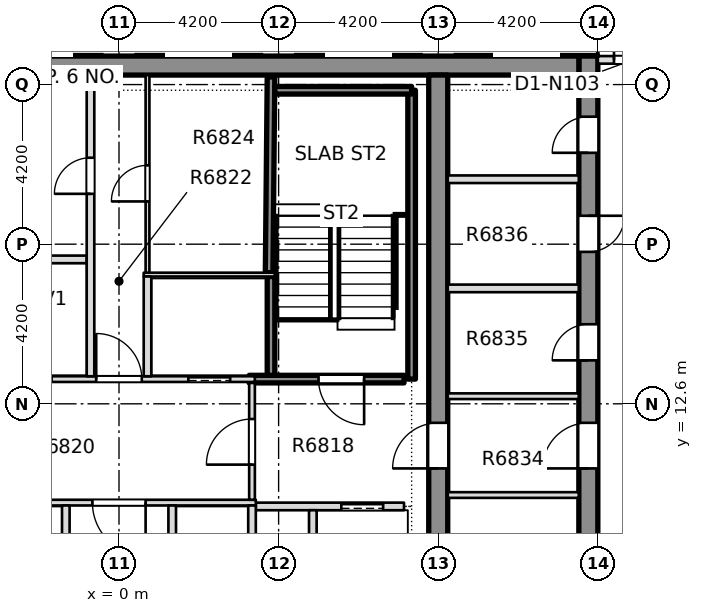
"""IFC4 building model, lengths in metres.
Left out: names, types, materials, properties, quantities, classifications, styles, units other than length and angle.
Written with IfcOpenShell. Run it as: python <this file> out.ifc"""

import sys

from ifc_helpers import new_model, si_unit, direction, frame, frame_2d, origin, place, context, subcontext, project, spatial, rectangle, extrude, element, fill, save


model = new_model("IFC4")
c1 = context("Model", 3, precision=1e-05, world=origin(), true_north=direction((0.0, 1.0)))
c2 = subcontext(c1, "Body", "Model", "MODEL_VIEW")
j1 = project(units=[si_unit("LENGTHUNIT", "METRE"), si_unit("PLANEANGLEUNIT", "RADIAN")], contexts=[c1])
p1 = place(None, origin())
s1 = spatial("IfcSite", under=j1, at=p1, CompositionType="ELEMENT")
p2 = place(p1, origin())
s2 = spatial("IfcBuilding", under=s1, at=p2, CompositionType="ELEMENT")
p3 = place(p2, frame((0.0, 0.0, 257.95)))
s3 = spatial("IfcBuildingStorey", under=s2, at=p3, CompositionType="ELEMENT", Elevation=257.95)
p4 = place(p3, frame((12.35, -8.4, -0.4), z_axis=(0.0, 0.0, 1.0), x_axis=(0.0, 1.0, 0.0)))
e1 = element("IfcWall", 1, at=p4, inside=s3, PredefinedType="SHEAR", context=c2, shape_type="SweptSolid", body=[
    extrude(rectangle(XDim=30.15, YDim=0.5, at=frame_2d((15.075, 0.0))), origin(), (0.0, 0.0, 1.0), 3.45),
])
p5 = place(p4, frame((4.113, 0.0, 0.4)))
e2 = element("IfcOpeningElement", 2, at=p5, cuts=e1, PredefinedType="OPENING", context=c2, shape_type="SweptSolid", body=[
    extrude(rectangle(XDim=0.95, YDim=2.1, at=frame_2d((0.475, 1.05))), frame((0.0, 0.26, 0.0), z_axis=(0.0, -1.0, 0.0), x_axis=(1.0, 0.0, 0.0)), (0.0, 0.0, 1.0), 0.52),
])
p6 = place(p4, frame((9.89, 0.0, 0.4)))
e3 = element("IfcOpeningElement", 3, at=p6, cuts=e1, PredefinedType="OPENING", context=c2, shape_type="SweptSolid", body=[
    extrude(rectangle(XDim=0.95, YDim=2.1, at=frame_2d((0.475, 1.05))), frame((0.0, 0.26, 0.0), z_axis=(0.0, -1.0, 0.0), x_axis=(1.0, 0.0, 0.0)), (0.0, 0.0, 1.0), 0.52),
])
p7 = place(p4, frame((15.052, 0.0, 0.4)))
e4 = element("IfcOpeningElement", 4, at=p7, cuts=e1, PredefinedType="OPENING", context=c2, shape_type="SweptSolid", body=[
    extrude(rectangle(XDim=0.95, YDim=2.1, at=frame_2d((0.475, 1.05))), frame((0.0, 0.26, 0.0), z_axis=(0.0, -1.0, 0.0), x_axis=(1.0, 0.0, 0.0)), (0.0, 0.0, 1.0), 0.52),
])
p8 = place(p4, frame((22.144, 0.0, 0.4)))
e5 = element("IfcOpeningElement", 5, at=p8, cuts=e1, PredefinedType="OPENING", context=c2, shape_type="SweptSolid", body=[
    extrude(rectangle(XDim=0.95, YDim=2.1, at=frame_2d((0.475, 1.05))), frame((0.0, 0.26, 0.0), z_axis=(0.0, -1.0, 0.0), x_axis=(1.0, 0.0, 0.0)), (0.0, 0.0, 1.0), 0.52),
])
p9 = place(p4, frame((24.998, 0.0, 0.4)))
e6 = element("IfcOpeningElement", 6, at=p9, cuts=e1, PredefinedType="OPENING", context=c2, shape_type="SweptSolid", body=[
    extrude(rectangle(XDim=0.95, YDim=2.1, at=frame_2d((0.475, 1.05))), frame((0.0, 0.26, 0.0), z_axis=(0.0, -1.0, 0.0), x_axis=(1.0, 0.0, 0.0)), (0.0, 0.0, 1.0), 0.52),
])
p10 = place(p4, frame((27.605, 0.0, 0.4)))
e7 = element("IfcOpeningElement", 7, at=p10, cuts=e1, PredefinedType="OPENING", context=c2, shape_type="SweptSolid", body=[
    extrude(rectangle(XDim=0.95, YDim=2.1, at=frame_2d((0.475, 1.05))), frame((0.0, 0.26, 0.0), z_axis=(0.0, -1.0, 0.0), x_axis=(1.0, 0.0, 0.0)), (0.0, 0.0, 1.0), 0.52),
])
p11 = place(p4, frame((19.3, 0.0, 0.4)))
e8 = element("IfcOpeningElement", 8, at=p11, cuts=e1, PredefinedType="OPENING", context=c2, shape_type="SweptSolid", body=[
    extrude(rectangle(XDim=1.2, YDim=2.1, at=frame_2d((0.6, 1.05))), frame((0.0, 0.26, 0.0), z_axis=(0.0, -1.0, 0.0), x_axis=(1.0, 0.0, 0.0)), (0.0, 0.0, 1.0), 0.52),
])
p12 = place(p3, frame((-12.1, 21.5, -0.4), z_axis=(0.0, 0.0, 1.0), x_axis=(1.0, 0.0, 0.0)))
e9 = element("IfcWall", 9, at=p12, inside=s3, PredefinedType="SHEAR", context=c2, shape_type="SweptSolid", body=[
    extrude(rectangle(XDim=24.2, YDim=0.5, at=frame_2d((12.1, 0.0))), origin(), (0.0, 0.0, 1.0), 3.45),
])
p13 = place(p3, frame((8.4, -7.9, -0.4), z_axis=(0.0, 0.0, 1.0), x_axis=(0.0, 1.0, 0.0)))
e10 = element("IfcWall", 10, at=p13, inside=s3, PredefinedType="SHEAR", context=c2, shape_type="SweptSolid", body=[
    extrude(rectangle(XDim=29.15, YDim=0.5, at=frame_2d((14.575, 0.0))), origin(), (0.0, 0.0, 1.0), 3.45),
])
p14 = place(p13, frame((18.8, 0.0, 0.4)))
e11 = element("IfcOpeningElement", 11, at=p14, cuts=e10, PredefinedType="OPENING", context=c2, shape_type="SweptSolid", body=[
    extrude(rectangle(XDim=1.2, YDim=2.1, at=frame_2d((0.6, 1.05))), frame((0.0, 0.26, 0.0), z_axis=(0.0, -1.0, 0.0), x_axis=(1.0, 0.0, 0.0)), (0.0, 0.0, 1.0), 0.52),
])
p15 = place(p3, frame((16.35, 21.65, 0.0), z_axis=(0.0, 0.0, 1.0), x_axis=(-1.0, 0.0, 0.0)))
e12 = element("IfcWall", 12, at=p15, inside=s3, PredefinedType="STANDARD", context=c2, shape_type="SweptSolid", body=[
    extrude(rectangle(XDim=3.75, YDim=0.2, at=frame_2d((1.875, 0.0))), origin(), (0.0, 0.0, 1.0), 3.05),
])
p16 = place(p15, frame((2.325, 0.0, 0.0)))
e13 = element("IfcOpeningElement", 13, at=p16, cuts=e12, PredefinedType="OPENING", context=c2, shape_type="SweptSolid", body=[
    extrude(rectangle(XDim=1.0, YDim=2.4, at=frame_2d((0.5, 1.2))), frame((0.0, 0.11, 0.0), z_axis=(0.0, -1.0, 0.0), x_axis=(1.0, 0.0, 0.0)), (0.0, 0.0, 1.0), 0.22),
])
p17 = place(p3, frame((3.6, 9.9, 0.0), z_axis=(0.0, 0.0, 1.0), x_axis=(1.0, 0.0, 0.0)))
e14 = element("IfcWall", 14, at=p17, inside=s3, PredefinedType="PARTITIONING", context=c2, shape_type="SweptSolid", body=[
    extrude(rectangle(XDim=3.9, YDim=0.2, at=frame_2d((1.95, 0.0))), origin(), (0.0, 0.0, 1.0), 3.05),
])
p18 = place(p17, frame((2.25, 0.0, 0.0)))
e15 = element("IfcOpeningElement", 15, at=p18, cuts=e14, PredefinedType="OPENING", context=c2, shape_type="SweptSolid", body=[
    extrude(rectangle(XDim=1.1, YDim=2.1, at=frame_2d((0.55, 1.05))), frame((0.0, 0.11, 0.0), z_axis=(0.0, -1.0, 0.0), x_axis=(1.0, 0.0, 0.0)), (0.0, 0.0, 1.0), 0.22),
])
p19 = place(p3, frame((-3.6, 10.0, 0.0), z_axis=(0.0, 0.0, 1.0), x_axis=(1.0, 0.0, 0.0)))
e16 = element("IfcWall", 16, at=p19, inside=s3, PredefinedType="PARTITIONING", context=c2, shape_type="SweptSolid", body=[
    extrude(rectangle(XDim=7.2, YDim=0.15, at=frame_2d((3.6, 0.0))), origin(), (0.0, 0.0, 1.0), 3.05),
])
p20 = place(p19, frame((2.9, 0.0, 0.0)))
e17 = element("IfcOpeningElement", 17, at=p20, cuts=e16, PredefinedType="OPENING", context=c2, shape_type="SweptSolid", body=[
    extrude(rectangle(XDim=1.4, YDim=2.1, at=frame_2d((0.7, 1.05))), frame((0.0, 0.085, 0.0), z_axis=(0.0, -1.0, 0.0), x_axis=(1.0, 0.0, 0.0)), (0.0, 0.0, 1.0), 0.17),
])
p21 = place(p3, frame((-3.575, 13.25, 0.0), z_axis=(0.0, 0.0, 1.0), x_axis=(1.0, 0.0, 0.0)))
e18 = element("IfcWall", 18, at=p21, inside=s3, PredefinedType="PARTITIONING", context=c2, shape_type="SweptSolid", body=[
    extrude(rectangle(XDim=7.15, YDim=0.15, at=frame_2d((3.575, 0.0))), origin(), (0.0, 0.0, 1.0), 3.05),
])
p22 = place(p21, frame((0.6, 0.0, 0.0)))
e19 = element("IfcOpeningElement", 19, at=p22, cuts=e18, PredefinedType="OPENING", context=c2, shape_type="SweptSolid", body=[
    extrude(rectangle(XDim=1.2, YDim=2.1, at=frame_2d((0.6, 1.05))), frame((0.0, 0.085, 0.0), z_axis=(0.0, -1.0, 0.0), x_axis=(1.0, 0.0, 0.0)), (0.0, 0.0, 1.0), 0.17),
])
p23 = place(p21, frame((5.4, 0.0, 0.0)))
e20 = element("IfcOpeningElement", 20, at=p23, cuts=e18, PredefinedType="OPENING", context=c2, shape_type="SweptSolid", body=[
    extrude(rectangle(XDim=1.1, YDim=2.1, at=frame_2d((0.55, 1.05))), frame((0.0, 0.085, 0.0), z_axis=(0.0, -1.0, 0.0), x_axis=(1.0, 0.0, 0.0)), (0.0, 0.0, 1.0), 0.17),
])
p24 = place(p21, frame((2.975, 0.0, 0.0)))
e21 = element("IfcOpeningElement", 21, at=p24, cuts=e18, PredefinedType="OPENING", context=c2, shape_type="SweptSolid", body=[
    extrude(rectangle(XDim=1.2, YDim=2.1, at=frame_2d((0.6, 1.05))), frame((0.0, 0.085, 0.0), z_axis=(0.0, -1.0, 0.0), x_axis=(1.0, 0.0, 0.0)), (0.0, 0.0, 1.0), 0.17),
])
p25 = place(p3, frame((3.425, 13.25, 0.0), z_axis=(0.0, 0.0, 1.0), x_axis=(1.0, 0.0, 0.0)))
e22 = element("IfcWall", 22, at=p25, inside=s3, PredefinedType="SOLIDWALL", context=c2, shape_type="SweptSolid", body=[
    extrude(rectangle(XDim=4.075, YDim=0.2, at=frame_2d((2.038, 0.0))), origin(), (0.0, 0.0, 1.0), 3.05),
])
p26 = place(p25, frame((1.825, 0.0, 0.0)))
e23 = element("IfcOpeningElement", 23, at=p26, cuts=e22, PredefinedType="OPENING", context=c2, shape_type="SweptSolid", body=[
    extrude(rectangle(XDim=1.2, YDim=2.1, at=frame_2d((0.6, 1.05))), frame((0.0, 0.11, 0.0), z_axis=(0.0, -1.0, 0.0), x_axis=(1.0, 0.0, 0.0)), (0.0, 0.0, 1.0), 0.22),
])
p27 = place(p3, frame((0.65, 16.0, 0.0), z_axis=(0.0, 0.0, 1.0), x_axis=(1.0, 0.0, 0.0)))
e24 = element("IfcWall", 24, at=p27, inside=s3, PredefinedType="PARTITIONING", context=c2, shape_type="SweptSolid", body=[
    extrude(rectangle(XDim=3.45, YDim=0.1, at=frame_2d((1.725, 0.0))), origin(), (0.0, 0.0, 1.0), 3.05),
])
p28 = place(p3, frame((-3.9, 16.4, 0.0), z_axis=(0.0, 0.0, 1.0), x_axis=(1.0, 0.0, 0.0)))
e25 = element("IfcWall", 25, at=p28, inside=s3, PredefinedType="PARTITIONING", context=c2, shape_type="SweptSolid", body=[
    extrude(rectangle(XDim=3.05, YDim=0.2, at=frame_2d((1.525, 0.0))), origin(), (0.0, 0.0, 1.0), 3.05),
])
p29 = place(p3, frame((-1.4, 7.075, 0.0), z_axis=(0.0, 0.0, 1.0), x_axis=(0.0, 1.0, 0.0)))
e26 = element("IfcWall", 26, at=p29, inside=s3, PredefinedType="PARTITIONING", context=c2, shape_type="SweptSolid", body=[
    extrude(rectangle(XDim=2.85, YDim=0.2, at=frame_2d((1.425, 0.0))), origin(), (0.0, 0.0, 1.0), 3.05),
])
p30 = place(p3, frame((-0.75, 13.325, 0.0), z_axis=(0.0, 0.0, 1.0), x_axis=(0.0, 1.0, 0.0)))
e27 = element("IfcWall", 27, at=p30, inside=s3, PredefinedType="PARTITIONING", context=c2, shape_type="SweptSolid", body=[
    extrude(rectangle(XDim=7.924, YDim=0.2, at=frame_2d((3.962, 0.0))), origin(), (0.0, 0.0, 1.0), 3.05),
])
p31 = place(p30, frame((4.8, 0.0, 0.0)))
e28 = element("IfcOpeningElement", 28, at=p31, cuts=e27, PredefinedType="OPENING", context=c2, shape_type="SweptSolid", body=[
    extrude(rectangle(XDim=0.95, YDim=2.1, at=frame_2d((0.475, 1.05))), frame((0.0, 0.11, 0.0), z_axis=(0.0, -1.0, 0.0), x_axis=(1.0, 0.0, 0.0)), (0.0, 0.0, 1.0), 0.22),
])
p32 = place(p3, frame((0.75, 13.325, 0.0), z_axis=(0.0, 0.0, 1.0), x_axis=(0.0, 1.0, 0.0)))
e29 = element("IfcWall", 29, at=p32, inside=s3, PredefinedType="PARTITIONING", context=c2, shape_type="SweptSolid", body=[
    extrude(rectangle(XDim=2.625, YDim=0.2, at=frame_2d((1.312, 0.0))), origin(), (0.0, 0.0, 1.0), 3.05),
])
p33 = place(p3, frame((0.75, 16.05, 0.0), z_axis=(0.0, 0.0, 1.0), x_axis=(0.0, 1.0, 0.0)))
e30 = element("IfcWall", 30, at=p33, inside=s3, PredefinedType="PARTITIONING", context=c2, shape_type="SweptSolid", body=[
    extrude(rectangle(XDim=5.199, YDim=0.1, at=frame_2d((2.6, 0.0))), origin(), (0.0, 0.0, 1.0), 3.05),
])
p34 = place(p33, frame((1.875, 0.0, 0.0)))
e31 = element("IfcOpeningElement", 31, at=p34, cuts=e30, PredefinedType="OPENING", context=c2, shape_type="SweptSolid", body=[
    extrude(rectangle(XDim=0.95, YDim=2.1, at=frame_2d((0.475, 1.05))), frame((0.0, 0.06, 0.0), z_axis=(0.0, -1.0, 0.0), x_axis=(1.0, 0.0, 0.0)), (0.0, 0.0, 1.0), 0.12),
])
for number, where, z_axis, x_axis in (
    (32, (1.4, 7.075, 0.0), (0.0, 0.0, 1.0), (0.0, 1.0, 0.0)),
    (33, (3.5, 7.075, 0.0), (0.0, 0.0, 1.0), (0.0, 1.0, 0.0)),
):
    element("IfcWall", number, at=place(p3, frame(where, z_axis=z_axis, x_axis=x_axis)), inside=s3, PredefinedType="PARTITIONING", context=c2, shape_type="SweptSolid", body=[
        extrude(rectangle(XDim=2.85, YDim=0.2, at=frame_2d((1.425, 0.0))), origin(), (0.0, 0.0, 1.0), 3.05),
    ])
p35 = place(p3, frame((3.5, 10.075, 0.0), z_axis=(0.0, 0.0, 1.0), x_axis=(0.0, 1.0, 0.0)))
e34 = element("IfcWall", 34, at=p35, inside=s3, PredefinedType="PARTITIONING", context=c2, shape_type="SweptSolid", body=[
    extrude(rectangle(XDim=3.075, YDim=0.15, at=frame_2d((1.538, 0.0))), origin(), (0.0, 0.0, 1.0), 3.05),
])
p36 = place(p35, frame((0.925, 0.0, 0.0)))
e35 = element("IfcOpeningElement", 35, at=p36, cuts=e34, PredefinedType="OPENING", context=c2, shape_type="SweptSolid", body=[
    extrude(rectangle(XDim=1.2, YDim=2.1, at=frame_2d((0.6, 1.05))), frame((0.0, 0.085, 0.0), z_axis=(0.0, -1.0, 0.0), x_axis=(1.0, 0.0, 0.0)), (0.0, 0.0, 1.0), 0.17),
])
p37 = place(p3, frame((4.0, 13.35, 0.0), z_axis=(0.0, 0.0, 1.0), x_axis=(0.0, 1.0, 0.0)))
e36 = element("IfcWall", 36, at=p37, inside=s3, PredefinedType="SOLIDWALL", context=c2, shape_type="SweptSolid", body=[
    extrude(rectangle(XDim=2.6, YDim=0.2, at=frame_2d((1.3, 0.0))), origin(), (0.0, 0.0, 1.0), 3.05),
])
p38 = place(p3, frame((3.95, 16.05, 0.0), z_axis=(0.0, 0.0, 1.0), x_axis=(0.009719787395, 0.999952761751, 0.0)))
e37 = element("IfcWall", 37, at=p38, inside=s3, PredefinedType="SOLIDWALL", context=c2, shape_type="SweptSolid", body=[
    extrude(rectangle(XDim=5.149, YDim=0.2, at=frame_2d((2.575, 0.0))), origin(), (0.0, 0.0, 1.0), 3.05),
])
p39 = place(p3, frame((5.1, 7.075, 0.0), z_axis=(0.0, 0.0, 1.0), x_axis=(0.0, 1.0, 0.0)))
e38 = element("IfcWall", 38, at=p39, inside=s3, PredefinedType="PARTITIONING", context=c2, shape_type="SweptSolid", body=[
    extrude(rectangle(XDim=2.725, YDim=0.2, at=frame_2d((1.363, 0.0))), origin(), (0.0, 0.0, 1.0), 3.05),
])
for number, where, z_axis, x_axis in (
    (39, (8.651, 10.2, 0.0), (0.0, 0.0, 1.0), (1.0, 0.0, 0.0)),
    (40, (8.651, 12.8, 0.0), (0.0, 0.0, 1.0), (1.0, 0.0, 0.0)),
):
    element("IfcWall", number, at=place(p3, frame(where, z_axis=z_axis, x_axis=x_axis)), inside=s3, PredefinedType="PARTITIONING", context=c2, shape_type="SweptSolid", body=[
        extrude(rectangle(XDim=3.448, YDim=0.15, at=frame_2d((1.724, 0.0))), origin(), (0.0, 0.0, 1.0), 3.05),
    ])
for number, where, z_axis, x_axis in (
    (41, (8.651, 15.637, 0.0), (0.0, 0.0, 1.0), (1.0, 0.0, 0.0)),
    (42, (8.651, 18.509, 0.0), (0.0, 0.0, 1.0), (1.0, 0.0, 0.0)),
):
    element("IfcWall", number, at=place(p3, frame(where, z_axis=z_axis, x_axis=x_axis)), inside=s3, PredefinedType="PARTITIONING", context=c2, shape_type="SweptSolid", body=[
        extrude(rectangle(XDim=3.448, YDim=0.2, at=frame_2d((1.724, 0.0))), origin(), (0.0, 0.0, 1.0), 3.05),
    ])
p40 = place(p3, frame((7.7, 13.25, 0.0), z_axis=(0.0, 0.0, 1.0), x_axis=(0.0, 1.0, 0.0)))
e43 = element("IfcWall", 43, at=p40, inside=s3, PredefinedType="SOLIDWALL", context=c2, shape_type="SweptSolid", body=[
    extrude(rectangle(XDim=7.6, YDim=0.2, at=frame_2d((3.8, 0.0))), origin(), (0.0, 0.0, 1.0), 3.05),
])
p41 = place(p3, frame((4.1, 20.85, 0.0), z_axis=(0.0, 0.0, 1.0), x_axis=(1.0, 0.0, 0.0)))
e44 = element("IfcWall", 44, at=p41, inside=s3, PredefinedType="SOLIDWALL", context=c2, shape_type="SweptSolid", body=[
    extrude(rectangle(XDim=3.6, YDim=0.2, at=frame_2d((1.8, 0.0))), origin(), (0.0, 0.0, 1.0), 3.05),
])
p42 = place(p16, origin())
e45 = element("IfcDoor", 45, at=p42, inside=s3, OperationType="SINGLE_SWING_LEFT", PredefinedType="DOOR", context=c2, shape_type="SweptSolid", body=[
    extrude(rectangle(XDim=1.0, YDim=2.4, at=frame_2d((0.5, 1.2))), frame((0.0, 0.025, 0.0), z_axis=(0.0, -1.0, 0.0), x_axis=(1.0, 0.0, 0.0)), (0.0, 0.0, 1.0), 0.05),
])
fill(e13, e45)
p43 = place(p26, origin())
e46 = element("IfcDoor", 46, at=p43, inside=s3, OperationType="SINGLE_SWING_RIGHT", PredefinedType="DOOR", context=c2, shape_type="SweptSolid", body=[
    extrude(rectangle(XDim=1.2, YDim=2.1, at=frame_2d((0.6, 1.05))), frame((0.0, 0.025, 0.0), z_axis=(0.0, -1.0, 0.0), x_axis=(1.0, 0.0, 0.0)), (0.0, 0.0, 1.0), 0.05),
])
fill(e23, e46)
p44 = place(p18, origin())
e47 = element("IfcDoor", 47, at=p44, inside=s3, OperationType="SLIDING_TO_LEFT", PredefinedType="DOOR", context=c2, shape_type="SweptSolid", body=[
    extrude(rectangle(XDim=1.1, YDim=2.1, at=frame_2d((0.55, 1.05))), frame((0.0, 0.025, 0.0), z_axis=(0.0, -1.0, 0.0), x_axis=(1.0, 0.0, 0.0)), (0.0, 0.0, 1.0), 0.05),
])
fill(e15, e47)
p45 = place(p20, origin())
e48 = element("IfcDoor", 48, at=p45, inside=s3, OperationType="SINGLE_SWING_RIGHT", PredefinedType="DOOR", context=c2, shape_type="SweptSolid", body=[
    extrude(rectangle(XDim=1.4, YDim=2.1, at=frame_2d((0.7, 1.05))), frame((0.0, 0.025, 0.0), z_axis=(0.0, -1.0, 0.0), x_axis=(1.0, 0.0, 0.0)), (0.0, 0.0, 1.0), 0.05),
])
fill(e17, e48)
p46 = place(p23, origin())
e49 = element("IfcDoor", 49, at=p46, inside=s3, OperationType="SLIDING_TO_LEFT", PredefinedType="DOOR", context=c2, shape_type="SweptSolid", body=[
    extrude(rectangle(XDim=1.1, YDim=2.1, at=frame_2d((0.55, 1.05))), frame((0.0, 0.025, 0.0), z_axis=(0.0, -1.0, 0.0), x_axis=(1.0, 0.0, 0.0)), (0.0, 0.0, 1.0), 0.05),
])
fill(e20, e49)
p47 = place(p24, origin())
e50 = element("IfcDoor", 50, at=p47, inside=s3, OperationType="SINGLE_SWING_RIGHT", PredefinedType="DOOR", context=c2, shape_type="SweptSolid", body=[
    extrude(rectangle(XDim=1.2, YDim=2.1, at=frame_2d((0.6, 1.05))), frame((0.0, 0.025, 0.0), z_axis=(0.0, -1.0, 0.0), x_axis=(1.0, 0.0, 0.0)), (0.0, 0.0, 1.0), 0.05),
])
fill(e21, e50)
p48 = place(p31, origin())
e51 = element("IfcDoor", 51, at=p48, inside=s3, OperationType="SINGLE_SWING_RIGHT", PredefinedType="DOOR", context=c2, shape_type="SweptSolid", body=[
    extrude(rectangle(XDim=0.95, YDim=2.1, at=frame_2d((0.475, 1.05))), frame((0.0, 0.025, 0.0), z_axis=(0.0, -1.0, 0.0), x_axis=(1.0, 0.0, 0.0)), (0.0, 0.0, 1.0), 0.05),
])
fill(e28, e51)
p49 = place(p34, origin())
e52 = element("IfcDoor", 52, at=p49, inside=s3, OperationType="SINGLE_SWING_LEFT", PredefinedType="DOOR", context=c2, shape_type="SweptSolid", body=[
    extrude(rectangle(XDim=0.95, YDim=2.1, at=frame_2d((0.475, 1.05))), frame((0.0, 0.025, 0.0), z_axis=(0.0, -1.0, 0.0), x_axis=(1.0, 0.0, 0.0)), (0.0, 0.0, 1.0), 0.05),
])
fill(e31, e52)
p50 = place(p36, origin())
e53 = element("IfcDoor", 53, at=p50, inside=s3, OperationType="SINGLE_SWING_LEFT", PredefinedType="DOOR", context=c2, shape_type="SweptSolid", body=[
    extrude(rectangle(XDim=1.2, YDim=2.1, at=frame_2d((0.6, 1.05))), frame((0.0, 0.025, 0.0), z_axis=(0.0, -1.0, 0.0), x_axis=(1.0, 0.0, 0.0)), (0.0, 0.0, 1.0), 0.05),
])
fill(e35, e53)
p51 = place(p8, origin())
e54 = element("IfcDoor", 54, at=p51, inside=s3, OperationType="SINGLE_SWING_LEFT", PredefinedType="DOOR", context=c2, shape_type="SweptSolid", body=[
    extrude(rectangle(XDim=0.95, YDim=2.1, at=frame_2d((0.475, 1.05))), frame((0.0, 0.025, 0.0), z_axis=(0.0, -1.0, 0.0), x_axis=(1.0, 0.0, 0.0)), (0.0, 0.0, 1.0), 0.05),
])
fill(e5, e54)
p52 = place(p9, origin())
e55 = element("IfcDoor", 55, at=p52, inside=s3, OperationType="SINGLE_SWING_LEFT", PredefinedType="DOOR", context=c2, shape_type="SweptSolid", body=[
    extrude(rectangle(XDim=0.95, YDim=2.1, at=frame_2d((0.475, 1.05))), frame((0.0, 0.025, 0.0), z_axis=(0.0, -1.0, 0.0), x_axis=(1.0, 0.0, 0.0)), (0.0, 0.0, 1.0), 0.05),
])
fill(e6, e55)
p53 = place(p10, origin())
e56 = element("IfcDoor", 56, at=p53, inside=s3, OperationType="SINGLE_SWING_LEFT", PredefinedType="DOOR", context=c2, shape_type="SweptSolid", body=[
    extrude(rectangle(XDim=0.95, YDim=2.1, at=frame_2d((0.475, 1.05))), frame((0.0, 0.025, 0.0), z_axis=(0.0, -1.0, 0.0), x_axis=(1.0, 0.0, 0.0)), (0.0, 0.0, 1.0), 0.05),
])
fill(e7, e56)
p54 = place(p11, origin())
e57 = element("IfcDoor", 57, at=p54, inside=s3, OperationType="SINGLE_SWING_LEFT", PredefinedType="DOOR", context=c2, shape_type="SweptSolid", body=[
    extrude(rectangle(XDim=1.2, YDim=2.1, at=frame_2d((0.6, 1.05))), frame((0.0, 0.025, 0.0), z_axis=(0.0, -1.0, 0.0), x_axis=(1.0, 0.0, 0.0)), (0.0, 0.0, 1.0), 0.05),
])
fill(e8, e57)
p55 = place(p14, origin())
e58 = element("IfcDoor", 58, at=p55, inside=s3, OperationType="SINGLE_SWING_LEFT", PredefinedType="DOOR", context=c2, shape_type="SweptSolid", body=[
    extrude(rectangle(XDim=1.2, YDim=2.1, at=frame_2d((0.6, 1.05))), frame((0.0, 0.025, 0.0), z_axis=(0.0, -1.0, 0.0), x_axis=(1.0, 0.0, 0.0)), (0.0, 0.0, 1.0), 0.05),
])
fill(e11, e58)
save(model, sys.argv[1])
